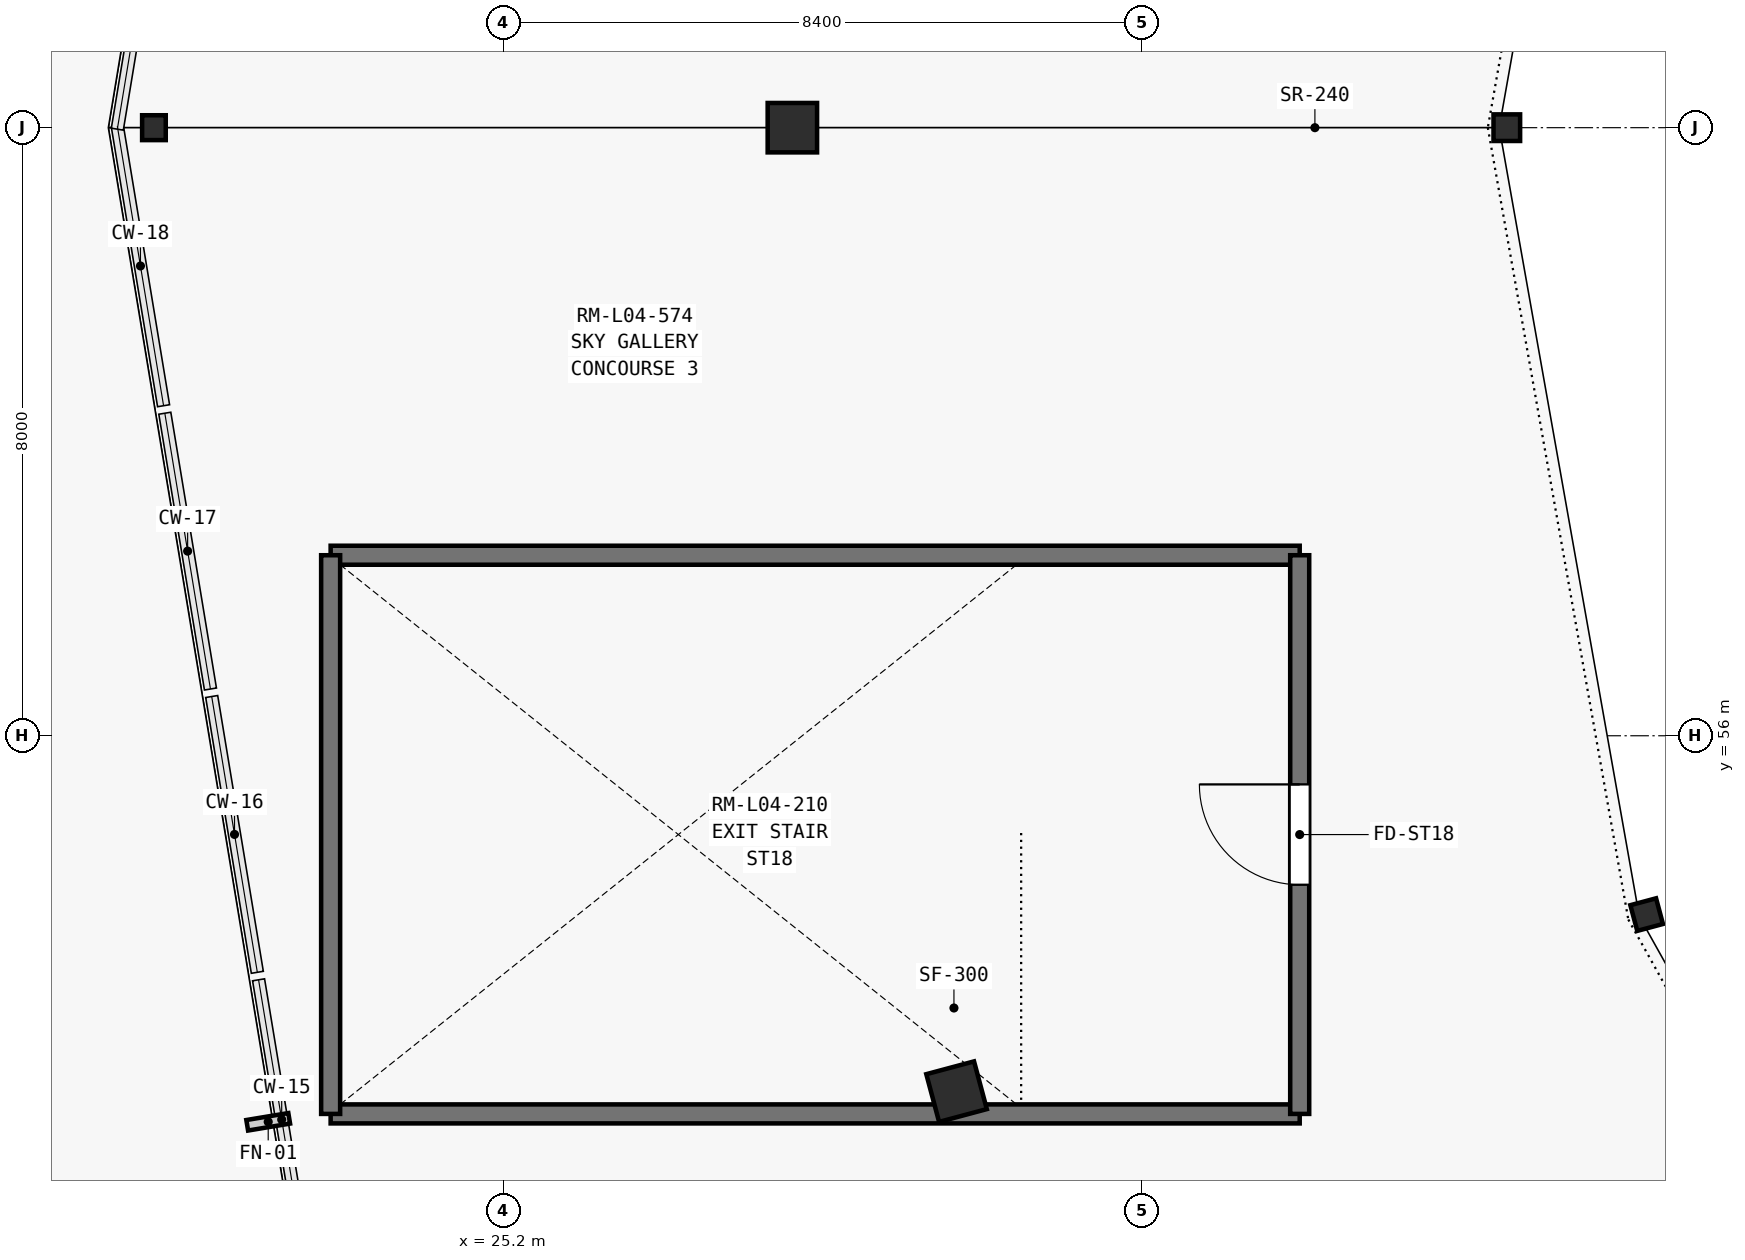
"""IFC4 building model, lengths in metres.
Left out: names, types, materials, properties, quantities, classifications, styles, units other than length and angle.
Written with IfcOpenShell. Run it as: python <this file> out.ifc"""

import sys

from ifc_helpers import new_model, si_unit, direction, frame, frame_2d, origin, origin_2d, place, context, subcontext, project, spatial, rectangle, i_section, extrude, element, fill, save


model = new_model("IFC4")
c1 = context("Model", 3, precision=1e-05, world=origin(), true_north=direction((0.0, 1.0)))
c2 = subcontext(c1, "Body", "Model", "MODEL_VIEW")
j1 = project(units=[si_unit("LENGTHUNIT", "METRE"), si_unit("PLANEANGLEUNIT", "RADIAN")], contexts=[c1])
p1 = place(None, origin())
s1 = spatial("IfcSite", under=j1, at=p1, CompositionType="ELEMENT")
p2 = place(p1, origin())
s2 = spatial("IfcBuilding", under=s1, at=p2, CompositionType="ELEMENT")
p3 = place(p2, frame((0.0, 0.0, 18.9)))
s3 = spatial("IfcBuildingStorey", under=s2, at=p3, CompositionType="ELEMENT", Elevation=18.9)
for number, where, z_axis, x_axis in (
    (1, (38.4, 64.0, 0.0), (0.0, 0.0, 1.0), (-1.0, 0.0, 0.0)),
    (2, (40.24, 53.647, 0.0), (0.0, 0.0, 1.0), (-0.966, -0.259, 0.0)),
):
    element("IfcColumn", number, at=place(p3, frame(where, z_axis=z_axis, x_axis=x_axis)), inside=s3, PredefinedType="COLUMN", context=c2, shape_type="SweptSolid", body=[
        extrude(i_section(OverallWidth=0.35, OverallDepth=0.35, WebThickness=0.014, FlangeThickness=0.024, at=origin_2d()), origin(), (0.0, 0.0, 1.0), 4.5),
    ])
for number, where, z_axis, x_axis in (
    (3, (29.0, 64.0, 0.0), (0.0, 0.0, 1.0), (-1.0, 0.0, 0.0)),
    (4, (31.16, 51.318, 0.0), (0.0, 0.0, 1.0), (-0.966, -0.259, 0.0)),
):
    element("IfcColumn", number, at=place(p3, frame(where, z_axis=z_axis, x_axis=x_axis)), inside=s3, PredefinedType="COLUMN", context=c2, shape_type="SweptSolid", body=[
        extrude(rectangle(XDim=0.65, YDim=0.65, at=origin_2d()), origin(), (0.0, 0.0, 1.0), 4.5),
    ])
p4 = place(p3, frame((20.6, 64.0, 0.0), z_axis=(0.0, 0.0, 1.0), x_axis=(-1.0, 0.0, 0.0)))
e5 = element("IfcColumn", 5, at=p4, inside=s3, PredefinedType="COLUMN", context=c2, shape_type="SweptSolid", body=[
    extrude(i_section(OverallWidth=0.311, OverallDepth=0.327, WebThickness=0.016, FlangeThickness=0.025, at=origin_2d()), origin(), (0.0, 0.0, 1.0), 4.5),
])
for number, where, z_axis, x_axis in (
    (6, (22.925, 51.025, 0.0), (0.0, 0.0, 1.0), (1.0, 0.0, 0.0)),
    (7, (22.925, 58.375, 0.0), (0.0, 0.0, 1.0), (1.0, 0.0, 0.0)),
):
    element("IfcWall", number, at=place(p3, frame(where, z_axis=z_axis, x_axis=x_axis)), inside=s3, PredefinedType="SHEAR", context=c2, shape_type="SweptSolid", body=[
        extrude(rectangle(XDim=12.75, YDim=0.25, at=frame_2d((6.375, 0.0))), origin(), (0.0, 0.0, 1.0), 4.5),
    ])
p5 = place(p3, frame((22.925, 51.025, 0.0), z_axis=(0.0, 0.0, 1.0), x_axis=(0.0, 1.0, 0.0)))
e8 = element("IfcWall", 8, at=p5, inside=s3, PredefinedType="SHEAR", context=c2, shape_type="SweptSolid", body=[
    extrude(rectangle(XDim=7.35, YDim=0.25, at=frame_2d((3.675, 0.0))), origin(), (0.0, 0.0, 1.0), 4.5),
])
p6 = place(p3, frame((35.675, 51.025, 0.0), z_axis=(0.0, 0.0, 1.0), x_axis=(0.0, 1.0, 0.0)))
e9 = element("IfcWall", 9, at=p6, inside=s3, PredefinedType="SHEAR", context=c2, shape_type="SweptSolid", body=[
    extrude(rectangle(XDim=7.35, YDim=0.25, at=frame_2d((3.675, 0.0))), origin(), (0.0, 0.0, 1.0), 4.5),
])
p7 = place(p6, frame((3.015, 0.0, 0.0)))
e10 = element("IfcOpeningElement", 10, at=p7, cuts=e9, PredefinedType="OPENING", context=c2, shape_type="SweptSolid", body=[
    extrude(rectangle(XDim=1.32, YDim=2.2, at=frame_2d((0.66, 1.1))), frame((0.0, 0.135, 0.0), z_axis=(0.0, -1.0, 0.0), x_axis=(1.0, 0.0, 0.0)), (0.0, 0.0, 1.0), 0.27),
])
p8 = place(p7, origin())
e11 = element("IfcDoor", 11, at=p8, inside=s3, OperationType="SINGLE_SWING_RIGHT", PredefinedType="DOOR", context=c2, shape_type="SweptSolid", body=[
    extrude(rectangle(XDim=1.32, YDim=2.2, at=frame_2d((0.66, 1.1))), frame((0.0, 0.025, 0.0), z_axis=(0.0, -1.0, 0.0), x_axis=(1.0, 0.0, 0.0)), (0.0, 0.0, 1.0), 0.05),
])
fill(e10, e11)
save(model, sys.argv[1])
